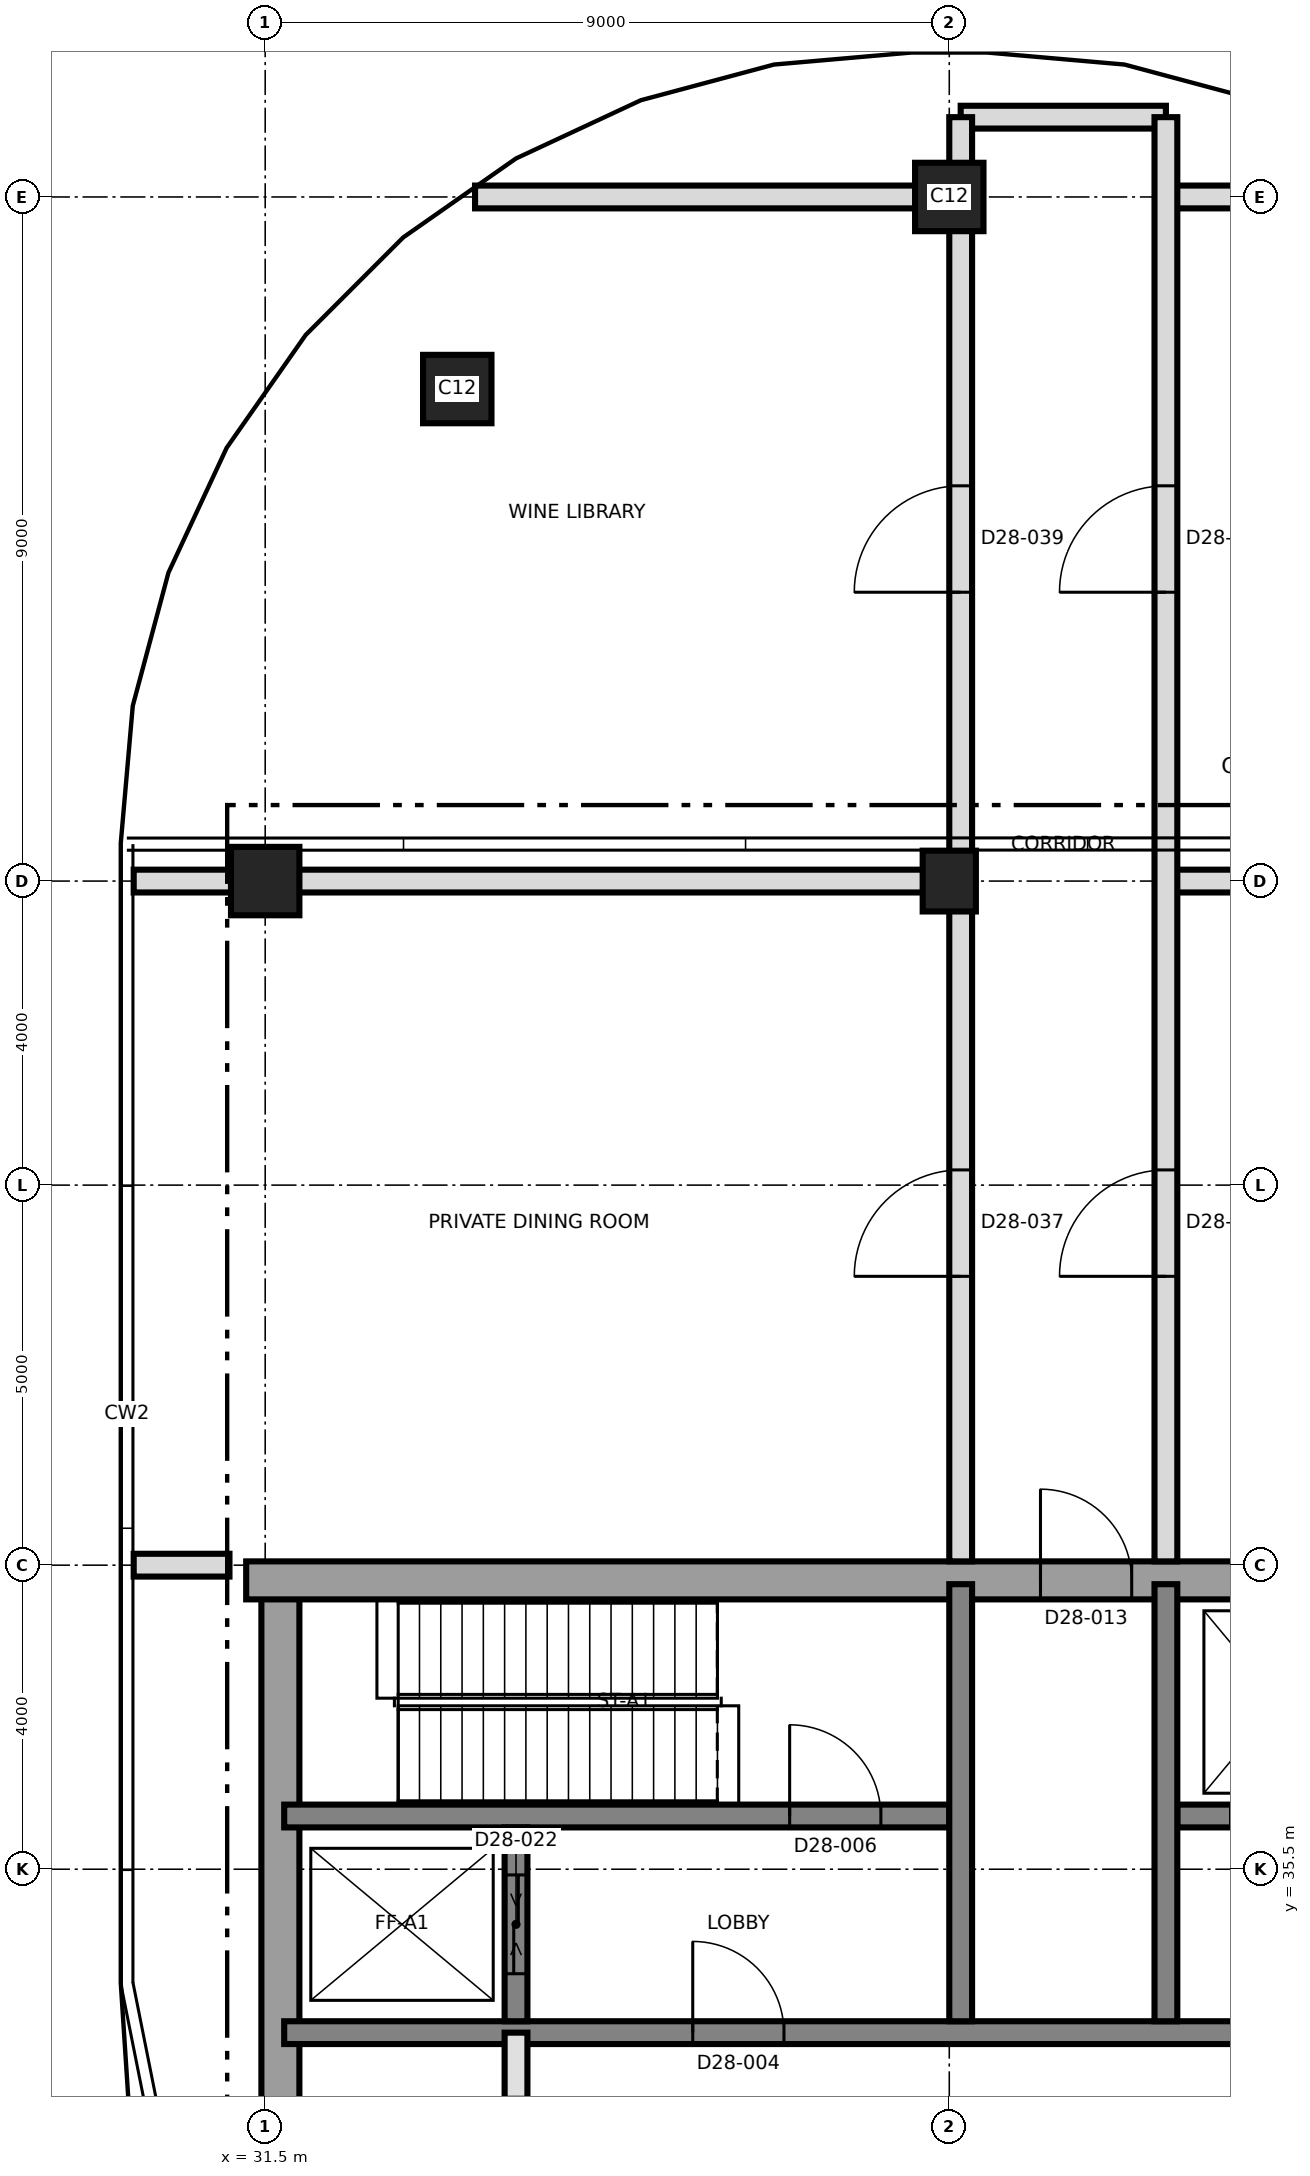
"""IFC4 building model, lengths in metres.
Left out: names, types, materials, properties, quantities, classifications, styles, units other than length and angle.
Written with IfcOpenShell. Run it as: python <this file> out.ifc"""

import sys

from ifc_helpers import new_model, si_unit, direction, frame, frame_2d, origin, origin_2d, place, context, subcontext, project, spatial, rectangle, extrude, element, fill, save


model = new_model("IFC4")
c1 = context("Model", 3, precision=1e-05, world=origin(), true_north=direction((0.0, 1.0)))
c2 = subcontext(c1, "Body", "Model", "MODEL_VIEW")
j1 = project(units=[si_unit("LENGTHUNIT", "METRE"), si_unit("PLANEANGLEUNIT", "RADIAN")], contexts=[c1])
p1 = place(None, origin())
s1 = spatial("IfcSite", under=j1, at=p1, CompositionType="ELEMENT")
p2 = place(p1, origin())
s2 = spatial("IfcBuilding", under=s1, at=p2, CompositionType="ELEMENT")
p3 = place(p2, frame((0.0, 0.0, 249.4)))
s3 = spatial("IfcBuildingStorey", under=s2, at=p3, CompositionType="ELEMENT", Elevation=249.4)
p4 = place(p3, frame((31.7, 21.75, 0.0), z_axis=(0.0, 0.0, 1.0), x_axis=(0.0, 1.0, 0.0)))
e1 = element("IfcWall", 1, at=p4, inside=s3, PredefinedType="SHEAR", context=c2, shape_type="SweptSolid", body=[
    extrude(rectangle(XDim=17.5, YDim=0.5, at=frame_2d((8.75, 0.0))), origin(), (0.0, 0.0, 1.0), 5.5),
])
p5 = place(p3, frame((31.25, 39.3, 0.0), z_axis=(0.0, 0.0, 1.0), x_axis=(1.0, 0.0, 0.0)))
e2 = element("IfcWall", 2, at=p5, inside=s3, PredefinedType="SHEAR", context=c2, shape_type="SweptSolid", body=[
    extrude(rectangle(XDim=27.0, YDim=0.5, at=frame_2d((13.5, 0.0))), origin(), (0.0, 0.0, 1.0), 5.5),
])
p6 = place(p5, frame((10.45, 0.0, 0.0)))
e3 = element("IfcOpeningElement", 3, at=p6, cuts=e2, PredefinedType="OPENING", context=c2, shape_type="SweptSolid", body=[
    extrude(rectangle(XDim=1.2, YDim=2.1, at=frame_2d((0.6, 1.05))), frame((0.0, 0.26, 0.0), z_axis=(0.0, -1.0, 0.0), x_axis=(1.0, 0.0, 0.0)), (0.0, 0.0, 1.0), 0.52),
])
p7 = place(p3, frame((31.75, 33.35, 0.0), z_axis=(0.0, 0.0, 1.0), x_axis=(1.0, 0.0, 0.0)))
e4 = element("IfcWall", 4, at=p7, inside=s3, PredefinedType="SHEAR", context=c2, shape_type="SweptSolid", body=[
    extrude(rectangle(XDim=26.5, YDim=0.3, at=frame_2d((13.25, 0.0))), origin(), (0.0, 0.0, 1.0), 5.5),
])
p8 = place(p7, frame((13.9, 0.0, 0.0)))
e5 = element("IfcOpeningElement", 5, at=p8, cuts=e4, PredefinedType="OPENING", context=c2, shape_type="SweptSolid", body=[
    extrude(rectangle(XDim=1.4, YDim=2.1, at=frame_2d((0.7, 1.05))), frame((0.0, 0.16, 0.0), z_axis=(0.0, -1.0, 0.0), x_axis=(1.0, 0.0, 0.0)), (0.0, 0.0, 1.0), 0.32),
])
p9 = place(p7, frame((5.375, 0.0, 0.0)))
e6 = element("IfcOpeningElement", 6, at=p9, cuts=e4, PredefinedType="OPENING", context=c2, shape_type="SweptSolid", body=[
    extrude(rectangle(XDim=1.2, YDim=2.1, at=frame_2d((0.6, 1.05))), frame((0.0, 0.16, 0.0), z_axis=(0.0, -1.0, 0.0), x_axis=(1.0, 0.0, 0.0)), (0.0, 0.0, 1.0), 0.32),
])
p10 = place(p7, frame((19.925, 0.0, 0.0)))
e7 = element("IfcOpeningElement", 7, at=p10, cuts=e4, PredefinedType="OPENING", context=c2, shape_type="SweptSolid", body=[
    extrude(rectangle(XDim=1.2, YDim=2.1, at=frame_2d((0.6, 1.05))), frame((0.0, 0.16, 0.0), z_axis=(0.0, -1.0, 0.0), x_axis=(1.0, 0.0, 0.0)), (0.0, 0.0, 1.0), 0.32),
])
p11 = place(p3, frame((31.75, 36.2, 0.0), z_axis=(0.0, 0.0, 1.0), x_axis=(1.0, 0.0, 0.0)))
e8 = element("IfcWall", 8, at=p11, inside=s3, PredefinedType="SHEAR", context=c2, shape_type="SweptSolid", body=[
    extrude(rectangle(XDim=8.75, YDim=0.3, at=frame_2d((4.375, 0.0))), origin(), (0.0, 0.0, 1.0), 5.5),
])
p12 = place(p11, frame((6.65, 0.0, 0.0)))
e9 = element("IfcOpeningElement", 9, at=p12, cuts=e8, PredefinedType="OPENING", context=c2, shape_type="SweptSolid", body=[
    extrude(rectangle(XDim=1.2, YDim=2.1, at=frame_2d((0.6, 1.05))), frame((0.0, 0.16, 0.0), z_axis=(0.0, -1.0, 0.0), x_axis=(1.0, 0.0, 0.0)), (0.0, 0.0, 1.0), 0.32),
])
p13 = place(p3, frame((43.5, 36.2, 0.0), z_axis=(0.0, 0.0, 1.0), x_axis=(1.0, 0.0, 0.0)))
e10 = element("IfcWall", 10, at=p13, inside=s3, PredefinedType="SHEAR", context=c2, shape_type="SweptSolid", body=[
    extrude(rectangle(XDim=14.75, YDim=0.3, at=frame_2d((7.375, 0.0))), origin(), (0.0, 0.0, 1.0), 5.5),
])
p14 = place(p13, frame((6.9, 0.0, 0.0)))
e11 = element("IfcOpeningElement", 11, at=p14, cuts=e10, PredefinedType="OPENING", context=c2, shape_type="SweptSolid", body=[
    extrude(rectangle(XDim=1.2, YDim=2.1, at=frame_2d((0.6, 1.05))), frame((0.0, 0.16, 0.0), z_axis=(0.0, -1.0, 0.0), x_axis=(1.0, 0.0, 0.0)), (0.0, 0.0, 1.0), 0.32),
])
p15 = place(p13, frame((0.7, 0.0, 0.0)))
e12 = element("IfcOpeningElement", 12, at=p15, cuts=e10, PredefinedType="OPENING", context=c2, shape_type="SweptSolid", body=[
    extrude(rectangle(XDim=1.3, YDim=2.4, at=frame_2d((0.65, 1.2))), frame((0.0, 0.16, 0.0), z_axis=(0.0, -1.0, 0.0), x_axis=(1.0, 0.0, 0.0)), (0.0, 0.0, 1.0), 0.32),
])
p16 = place(p13, frame((3.7, 0.0, 0.0)))
e13 = element("IfcOpeningElement", 13, at=p16, cuts=e10, PredefinedType="OPENING", context=c2, shape_type="SweptSolid", body=[
    extrude(rectangle(XDim=1.3, YDim=2.4, at=frame_2d((0.65, 1.2))), frame((0.0, 0.16, 0.0), z_axis=(0.0, -1.0, 0.0), x_axis=(1.0, 0.0, 0.0)), (0.0, 0.0, 1.0), 0.32),
])
for number, where, z_axis, x_axis in (
    (14, (40.65, 33.5, 0.0), (0.0, 0.0, 1.0), (0.0, 1.0, 0.0)),
    (15, (43.35, 33.5, 0.0), (0.0, 0.0, 1.0), (0.0, 1.0, 0.0)),
):
    element("IfcWall", number, at=place(p3, frame(where, z_axis=z_axis, x_axis=x_axis)), inside=s3, PredefinedType="SHEAR", context=c2, shape_type="SweptSolid", body=[
        extrude(rectangle(XDim=5.75, YDim=0.3, at=frame_2d((2.875, 0.0))), origin(), (0.0, 0.0, 1.0), 5.5),
    ])
p17 = place(p3, frame((34.8, 33.5, 0.0), z_axis=(0.0, 0.0, 1.0), x_axis=(0.0, 1.0, 0.0)))
e16 = element("IfcWall", 16, at=p17, inside=s3, PredefinedType="SHEAR", context=c2, shape_type="SweptSolid", body=[
    extrude(rectangle(XDim=2.55, YDim=0.3, at=frame_2d((1.275, 0.0))), origin(), (0.0, 0.0, 1.0), 5.5),
])
p18 = place(p17, frame((0.625, 0.0, 0.0)))
e17 = element("IfcOpeningElement", 17, at=p18, cuts=e16, PredefinedType="OPENING", context=c2, shape_type="SweptSolid", body=[
    extrude(rectangle(XDim=1.3, YDim=2.4, at=frame_2d((0.65, 1.2))), frame((0.0, 0.16, 0.0), z_axis=(0.0, -1.0, 0.0), x_axis=(1.0, 0.0, 0.0)), (0.0, 0.0, 1.0), 0.32),
])
p19 = place(p3, frame((31.5, 48.5, 0.0), z_axis=(0.0, 0.0, 1.0), x_axis=(1.0, 0.0, 0.0)))
e18 = element("IfcColumn", 18, at=p19, inside=s3, PredefinedType="COLUMN", context=c2, shape_type="SweptSolid", body=[
    extrude(rectangle(XDim=0.9, YDim=0.9, at=origin_2d()), origin(), (0.0, 0.0, 1.0), 5.5),
])
p20 = place(p3, frame((40.5, 48.5, 0.0), z_axis=(0.0, 0.0, 1.0), x_axis=(0.0, 1.0, 0.0)))
e19 = element("IfcColumn", 19, at=p20, inside=s3, PredefinedType="COLUMN", context=c2, shape_type="SweptSolid", body=[
    extrude(rectangle(XDim=0.8, YDim=0.7, at=origin_2d()), origin(), (0.0, 0.0, 1.0), 5.5),
])
for number, where, z_axis, x_axis in (
    (20, (34.027, 54.973, 0.0), (0.0, 0.0, 1.0), (1.0, 0.0, 0.0)),
    (21, (40.5, 57.5, 0.0), (0.0, 0.0, 1.0), (1.0, 0.0, 0.0)),
):
    element("IfcColumn", number, at=place(p3, frame(where, z_axis=z_axis, x_axis=x_axis)), inside=s3, PredefinedType="COLUMN", context=c2, shape_type="SweptSolid", body=[
        extrude(rectangle(XDim=0.9, YDim=0.9, at=origin_2d()), origin(), (0.0, 0.0, 1.0), 5.5),
    ])
p21 = place(p3, frame((34.8, 30.65, 0.0), z_axis=(0.0, 0.0, 1.0), x_axis=(0.0, 1.0, 0.0)))
e22 = element("IfcWall", 22, at=p21, inside=s3, PredefinedType="SOLIDWALL", context=c2, shape_type="SweptSolid", body=[
    extrude(rectangle(XDim=2.7, YDim=0.3, at=frame_2d((1.35, 0.0))), origin(), (0.0, 0.0, 1.0), 5.2),
])
p22 = place(p21, frame((0.85, 0.0, 0.0)))
e23 = element("IfcOpeningElement", 23, at=p22, cuts=e22, PredefinedType="OPENING", context=c2, shape_type="SweptSolid", body=[
    extrude(rectangle(XDim=1.0, YDim=2.1, at=frame_2d((0.5, 1.05))), frame((0.0, 0.16, 0.0), z_axis=(0.0, -1.0, 0.0), x_axis=(1.0, 0.0, 0.0)), (0.0, 0.0, 1.0), 0.32),
])
p23 = place(p3, frame((29.77, 39.5, 0.0), z_axis=(0.0, 0.0, 1.0), x_axis=(1.0, 0.0, 0.0)))
e24 = element("IfcWall", 24, at=p23, inside=s3, PredefinedType="PARTITIONING", context=c2, shape_type="SweptSolid", body=[
    extrude(rectangle(XDim=1.26, YDim=0.3, at=frame_2d((0.63, 0.0))), origin(), (0.0, 0.0, 1.0), 5.2),
])
p24 = place(p3, frame((29.77, 48.5, 0.0), z_axis=(0.0, 0.0, 1.0), x_axis=(1.0, 0.0, 0.0)))
e25 = element("IfcWall", 25, at=p24, inside=s3, PredefinedType="PARTITIONING", context=c2, shape_type="SweptSolid", body=[
    extrude(rectangle(XDim=10.88, YDim=0.3, at=frame_2d((5.44, 0.0))), origin(), (0.0, 0.0, 1.0), 5.2),
])
p25 = place(p3, frame((43.35, 48.5, 0.0), z_axis=(0.0, 0.0, 1.0), x_axis=(1.0, 0.0, 0.0)))
e26 = element("IfcWall", 26, at=p25, inside=s3, PredefinedType="PARTITIONING", context=c2, shape_type="SweptSolid", body=[
    extrude(rectangle(XDim=7.88, YDim=0.3, at=frame_2d((3.94, 0.0))), origin(), (0.0, 0.0, 1.0), 5.2),
])
p26 = place(p3, frame((34.261, 57.5, 0.0), z_axis=(0.0, 0.0, 1.0), x_axis=(1.0, 0.0, 0.0)))
e27 = element("IfcWall", 27, at=p26, inside=s3, PredefinedType="PARTITIONING", context=c2, shape_type="SweptSolid", body=[
    extrude(rectangle(XDim=6.389, YDim=0.3, at=frame_2d((3.194, 0.0))), origin(), (0.0, 0.0, 1.0), 5.2),
])
p27 = place(p3, frame((43.35, 57.5, 0.0), z_axis=(0.0, 0.0, 1.0), x_axis=(1.0, 0.0, 0.0)))
e28 = element("IfcWall", 28, at=p27, inside=s3, PredefinedType="PARTITIONING", context=c2, shape_type="SweptSolid", body=[
    extrude(rectangle(XDim=3.389, YDim=0.3, at=frame_2d((1.694, 0.0))), origin(), (0.0, 0.0, 1.0), 5.2),
])
p28 = place(p3, frame((40.65, 58.55, 0.0), z_axis=(0.0, 0.0, 1.0), x_axis=(1.0, 0.0, 0.0)))
e29 = element("IfcWall", 29, at=p28, inside=s3, PredefinedType="PARTITIONING", context=c2, shape_type="SweptSolid", body=[
    extrude(rectangle(XDim=2.7, YDim=0.3, at=frame_2d((1.35, 0.0))), origin(), (0.0, 0.0, 1.0), 5.2),
])
p29 = place(p3, frame((40.65, 39.55, 0.0), z_axis=(0.0, 0.0, 1.0), x_axis=(0.0, 1.0, 0.0)))
e30 = element("IfcWall", 30, at=p29, inside=s3, PredefinedType="PARTITIONING", context=c2, shape_type="SweptSolid", body=[
    extrude(rectangle(XDim=19.0, YDim=0.3, at=frame_2d((9.5, 0.0))), origin(), (0.0, 0.0, 1.0), 5.2),
])
p30 = place(p29, frame((3.75, 0.0, 0.0)))
e31 = element("IfcOpeningElement", 31, at=p30, cuts=e30, PredefinedType="OPENING", context=c2, shape_type="SweptSolid", body=[
    extrude(rectangle(XDim=1.4, YDim=2.1, at=frame_2d((0.7, 1.05))), frame((0.0, 0.16, 0.0), z_axis=(0.0, -1.0, 0.0), x_axis=(1.0, 0.0, 0.0)), (0.0, 0.0, 1.0), 0.32),
])
p31 = place(p29, frame((12.75, 0.0, 0.0)))
e32 = element("IfcOpeningElement", 32, at=p31, cuts=e30, PredefinedType="OPENING", context=c2, shape_type="SweptSolid", body=[
    extrude(rectangle(XDim=1.4, YDim=2.1, at=frame_2d((0.7, 1.05))), frame((0.0, 0.16, 0.0), z_axis=(0.0, -1.0, 0.0), x_axis=(1.0, 0.0, 0.0)), (0.0, 0.0, 1.0), 0.32),
])
p32 = place(p3, frame((43.35, 39.55, 0.0), z_axis=(0.0, 0.0, 1.0), x_axis=(0.0, 1.0, 0.0)))
e33 = element("IfcWall", 33, at=p32, inside=s3, PredefinedType="PARTITIONING", context=c2, shape_type="SweptSolid", body=[
    extrude(rectangle(XDim=19.0, YDim=0.3, at=frame_2d((9.5, 0.0))), origin(), (0.0, 0.0, 1.0), 5.2),
])
p33 = place(p32, frame((3.75, 0.0, 0.0)))
e34 = element("IfcOpeningElement", 34, at=p33, cuts=e33, PredefinedType="OPENING", context=c2, shape_type="SweptSolid", body=[
    extrude(rectangle(XDim=1.4, YDim=2.1, at=frame_2d((0.7, 1.05))), frame((0.0, 0.16, 0.0), z_axis=(0.0, -1.0, 0.0), x_axis=(1.0, 0.0, 0.0)), (0.0, 0.0, 1.0), 0.32),
])
p34 = place(p32, frame((12.75, 0.0, 0.0)))
e35 = element("IfcOpeningElement", 35, at=p34, cuts=e33, PredefinedType="OPENING", context=c2, shape_type="SweptSolid", body=[
    extrude(rectangle(XDim=1.4, YDim=2.1, at=frame_2d((0.7, 1.05))), frame((0.0, 0.16, 0.0), z_axis=(0.0, -1.0, 0.0), x_axis=(1.0, 0.0, 0.0)), (0.0, 0.0, 1.0), 0.32),
])
p35 = place(p9, origin())
e36 = element("IfcDoor", 36, at=p35, inside=s3, OperationType="SINGLE_SWING_LEFT", PredefinedType="DOOR", context=c2, shape_type="SweptSolid", body=[
    extrude(rectangle(XDim=1.2, YDim=2.1, at=frame_2d((0.6, 1.05))), frame((0.0, 0.025, 0.0), z_axis=(0.0, -1.0, 0.0), x_axis=(1.0, 0.0, 0.0)), (0.0, 0.0, 1.0), 0.05),
])
fill(e6, e36)
p36 = place(p12, origin())
e37 = element("IfcDoor", 37, at=p36, inside=s3, OperationType="SINGLE_SWING_RIGHT", PredefinedType="DOOR", context=c2, shape_type="SweptSolid", body=[
    extrude(rectangle(XDim=1.2, YDim=2.1, at=frame_2d((0.6, 1.05))), frame((0.0, 0.025, 0.0), z_axis=(0.0, -1.0, 0.0), x_axis=(1.0, 0.0, 0.0)), (0.0, 0.0, 1.0), 0.05),
])
fill(e9, e37)
p37 = place(p6, origin())
e38 = element("IfcDoor", 38, at=p37, inside=s3, OperationType="SINGLE_SWING_RIGHT", PredefinedType="DOOR", context=c2, shape_type="SweptSolid", body=[
    extrude(rectangle(XDim=1.2, YDim=2.1, at=frame_2d((0.6, 1.05))), frame((0.0, 0.025, 0.0), z_axis=(0.0, -1.0, 0.0), x_axis=(1.0, 0.0, 0.0)), (0.0, 0.0, 1.0), 0.05),
])
fill(e3, e38)
p38 = place(p15, origin())
e39 = element("IfcDoor", 39, at=p38, inside=s3, OperationType="SLIDING_TO_LEFT", PredefinedType="DOOR", context=c2, shape_type="SweptSolid", body=[
    extrude(rectangle(XDim=1.3, YDim=2.4, at=frame_2d((0.65, 1.2))), frame((0.0, 0.025, 0.0), z_axis=(0.0, -1.0, 0.0), x_axis=(1.0, 0.0, 0.0)), (0.0, 0.0, 1.0), 0.05),
])
fill(e12, e39)
p39 = place(p18, origin())
e40 = element("IfcDoor", 40, at=p39, inside=s3, OperationType="SLIDING_TO_LEFT", PredefinedType="DOOR", context=c2, shape_type="SweptSolid", body=[
    extrude(rectangle(XDim=1.3, YDim=2.4, at=frame_2d((0.65, 1.2))), frame((0.0, 0.025, 0.0), z_axis=(0.0, -1.0, 0.0), x_axis=(1.0, 0.0, 0.0)), (0.0, 0.0, 1.0), 0.05),
])
fill(e17, e40)
p40 = place(p33, origin())
e41 = element("IfcDoor", 41, at=p40, inside=s3, OperationType="SINGLE_SWING_LEFT", PredefinedType="DOOR", context=c2, shape_type="SweptSolid", body=[
    extrude(rectangle(XDim=1.4, YDim=2.1, at=frame_2d((0.7, 1.05))), frame((0.0, 0.025, 0.0), z_axis=(0.0, -1.0, 0.0), x_axis=(1.0, 0.0, 0.0)), (0.0, 0.0, 1.0), 0.05),
])
fill(e34, e41)
p41 = place(p30, origin())
e42 = element("IfcDoor", 42, at=p41, inside=s3, OperationType="SINGLE_SWING_LEFT", PredefinedType="DOOR", context=c2, shape_type="SweptSolid", body=[
    extrude(rectangle(XDim=1.4, YDim=2.1, at=frame_2d((0.7, 1.05))), frame((0.0, 0.025, 0.0), z_axis=(0.0, -1.0, 0.0), x_axis=(1.0, 0.0, 0.0)), (0.0, 0.0, 1.0), 0.05),
])
fill(e31, e42)
p42 = place(p34, origin())
e43 = element("IfcDoor", 43, at=p42, inside=s3, OperationType="SINGLE_SWING_LEFT", PredefinedType="DOOR", context=c2, shape_type="SweptSolid", body=[
    extrude(rectangle(XDim=1.4, YDim=2.1, at=frame_2d((0.7, 1.05))), frame((0.0, 0.025, 0.0), z_axis=(0.0, -1.0, 0.0), x_axis=(1.0, 0.0, 0.0)), (0.0, 0.0, 1.0), 0.05),
])
fill(e35, e43)
p43 = place(p31, origin())
e44 = element("IfcDoor", 44, at=p43, inside=s3, OperationType="SINGLE_SWING_LEFT", PredefinedType="DOOR", context=c2, shape_type="SweptSolid", body=[
    extrude(rectangle(XDim=1.4, YDim=2.1, at=frame_2d((0.7, 1.05))), frame((0.0, 0.025, 0.0), z_axis=(0.0, -1.0, 0.0), x_axis=(1.0, 0.0, 0.0)), (0.0, 0.0, 1.0), 0.05),
])
fill(e32, e44)
save(model, sys.argv[1])
